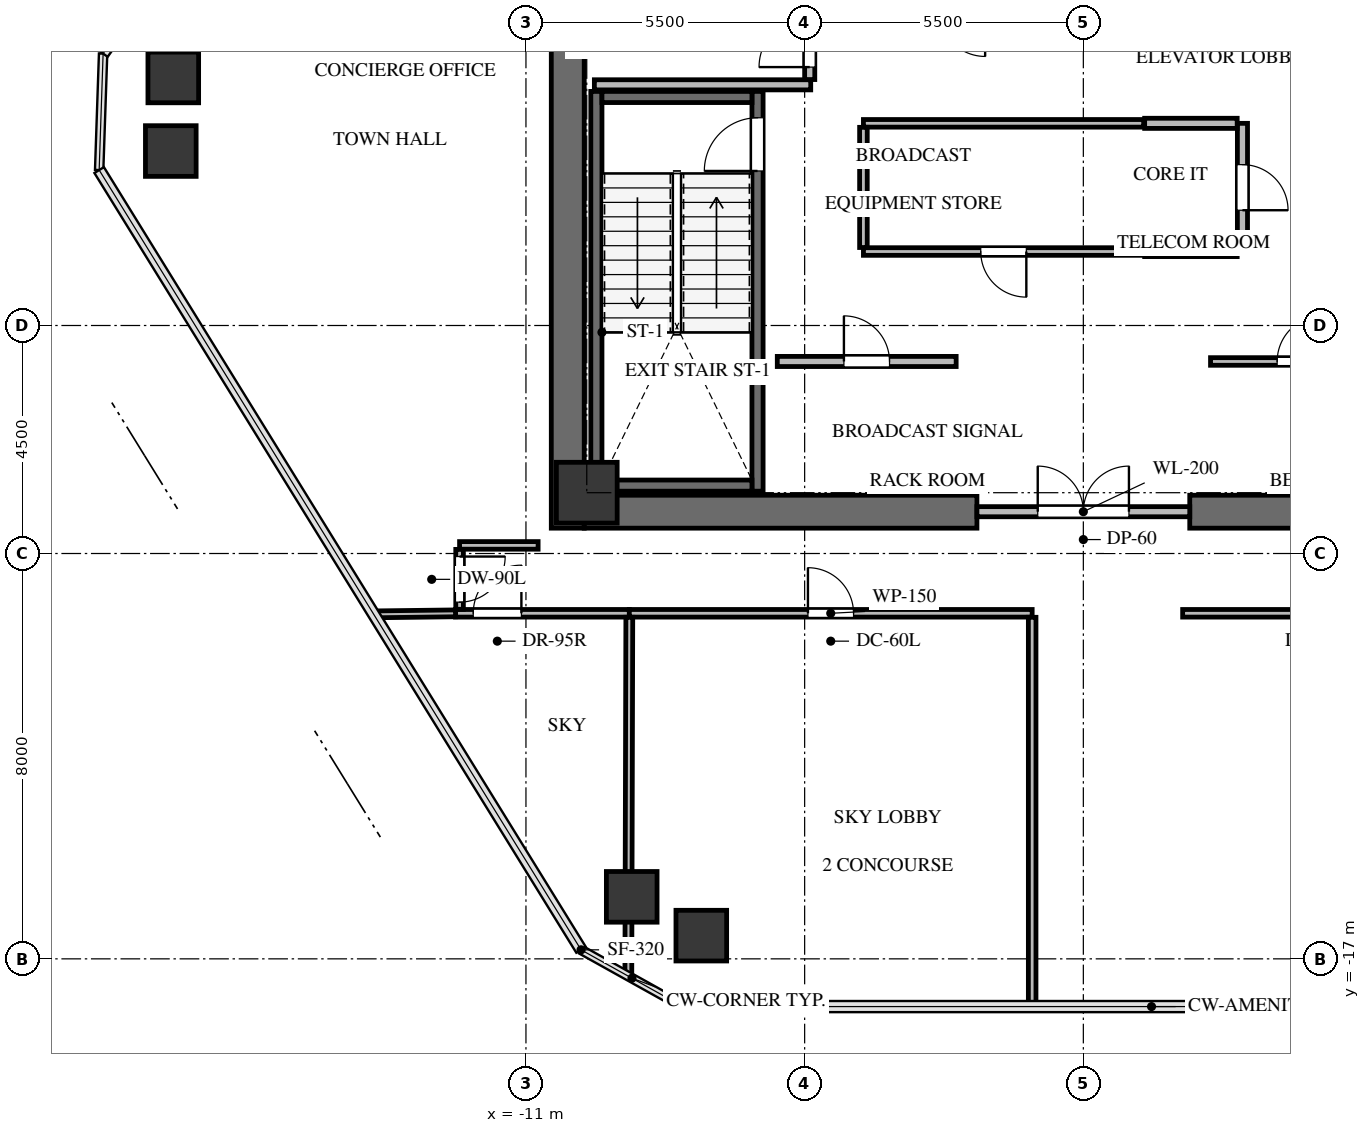
"""IFC4 building model, lengths in metres.
Left out: names, types, materials, properties, quantities, classifications, styles, units other than length and angle.
Written with IfcOpenShell. Run it as: python <this file> out.ifc"""

import sys

from ifc_helpers import new_model, si_unit, direction, frame, frame_2d, origin, origin_2d, place, context, subcontext, project, spatial, rectangle, extrude, source, transform, mapped, element, fill, save


model = new_model("IFC4")
c1 = context("Model", 3, precision=1e-05, world=origin(), true_north=direction((0.0, 1.0)))
c2 = subcontext(c1, "Body", "Model", "MODEL_VIEW")
j1 = project(units=[si_unit("LENGTHUNIT", "METRE"), si_unit("PLANEANGLEUNIT", "RADIAN")], contexts=[c1])
p1 = place(None, origin())
s1 = spatial("IfcSite", under=j1, at=p1, CompositionType="ELEMENT")
p2 = place(p1, origin())
s2 = spatial("IfcBuilding", under=s1, at=p2, CompositionType="ELEMENT")
p3 = place(p2, frame((0.0, 0.0, 155.1)))
s3 = spatial("IfcBuildingStorey", under=s2, at=p3, CompositionType="ELEMENT", Elevation=155.1)
p4 = place(p3, frame((-10.175, -8.5, 0.0), z_axis=(0.0, 0.0, 1.0), x_axis=(0.0, 1.0, 0.0)))
e1 = element("IfcWall", 1, at=p4, inside=s3, PredefinedType="SHEAR", context=c2, shape_type="SweptSolid", body=[
    extrude(rectangle(XDim=17.0, YDim=0.65, at=frame_2d((8.5, 0.0))), origin(), (0.0, 0.0, 1.0), 4.2),
])
for number, where, z_axis, x_axis in (
    (2, (-9.85, -8.175, 0.0), (0.0, 0.0, 1.0), (1.0, 0.0, 0.0)),
    (3, (2.1, -8.175, 0.0), (0.0, 0.0, 1.0), (1.0, 0.0, 0.0)),
):
    element("IfcWall", number, at=place(p3, frame(where, z_axis=z_axis, x_axis=x_axis)), inside=s3, PredefinedType="SHEAR", context=c2, shape_type="SweptSolid", body=[
        extrude(rectangle(XDim=7.75, YDim=0.65, at=frame_2d((3.875, 0.0))), origin(), (0.0, 0.0, 1.0), 4.2),
    ])
p5 = place(p3, frame((-6.43, -7.77, -0.32), z_axis=(0.0, 0.0, 1.0), x_axis=(0.0, 1.0, 0.0)))
e4 = element("IfcWall", 4, at=p5, inside=s3, PredefinedType="SHEAR", context=c2, shape_type="SweptSolid", body=[
    extrude(rectangle(XDim=7.89, YDim=0.22, at=frame_2d((3.945, 0.0))), origin(), (0.0, 0.0, 1.0), 4.28),
])
p6 = place(p5, frame((6.32, 0.0, 0.0)))
e5 = element("IfcOpeningElement", 5, at=p6, cuts=e4, PredefinedType="OPENING", context=c2, shape_type="SweptSolid", body=[
    extrude(rectangle(XDim=1.05, YDim=2.15, at=frame_2d((0.525, 1.075))), frame((0.0, 0.12, 0.0), z_axis=(0.0, -1.0, 0.0), x_axis=(1.0, 0.0, 0.0)), (0.0, 0.0, 1.0), 0.24),
])
p7 = place(p3, frame((-9.61, 0.12, -0.32), z_axis=(0.0, 0.0, 1.0), x_axis=(0.0, -1.0, 0.0)))
e6 = element("IfcWall", 6, at=p7, inside=s3, PredefinedType="SHEAR", context=c2, shape_type="SweptSolid", body=[
    extrude(rectangle(XDim=7.89, YDim=0.22, at=frame_2d((3.945, 0.0))), origin(), (0.0, 0.0, 1.0), 4.28),
])
for number, where, z_axis, x_axis in (
    (7, (-9.5, -7.66, -0.32), (0.0, 0.0, 1.0), (1.0, 0.0, 0.0)),
    (8, (-6.54, 0.01, -0.32), (0.0, 0.0, 1.0), (-1.0, 0.0, 0.0)),
):
    element("IfcWall", number, at=place(p3, frame(where, z_axis=z_axis, x_axis=x_axis)), inside=s3, PredefinedType="SHEAR", context=c2, shape_type="SweptSolid", body=[
        extrude(rectangle(XDim=2.96, YDim=0.22, at=frame_2d((1.48, 0.0))), origin(), (0.0, 0.0, 1.0), 4.28),
    ])
m1 = source(origin(), c2, "Body", "SweptSolid", [
    extrude(rectangle(XDim=1.2, YDim=1.2, at=origin_2d()), origin(), (0.0, 0.0, 1.0), 4.28),
])
p8 = place(p3, frame((-9.8, -7.8, -0.32), z_axis=(0.0, 0.0, 1.0), x_axis=(1.0, 0.0, 0.0)))
e9 = element("IfcColumn", 9, at=p8, inside=s3, PredefinedType="COLUMN", context=c2, shape_type="MappedRepresentation", body=[
    mapped(m1, transform((0.0, 0.0, 0.0), x_axis=(1.0, 0.0, 0.0), y_axis=(0.0, 1.0, 0.0), z_axis=(0.0, 0.0, 1.0), scale=1.0)),
])
m2 = source(origin(), c2, "Body", "SweptSolid", [
    extrude(rectangle(XDim=1.0, YDim=1.0, at=origin_2d()), origin(), (0.0, 0.0, 1.0), 4.28),
])
for number, where, z_axis, x_axis in (
    (10, (-8.913, -15.776, -0.32), (0.0, 0.0, 1.0), (1.0, 0.0, 0.0)),
    (11, (-18.009, -1.057, -0.32), (0.0, 0.0, 1.0), (1.0, 0.0, 0.0)),
    (12, (-17.96, 0.396, -0.32), (0.0, 0.0, 1.0), (1.0, 0.0, 0.0)),
    (13, (-7.54, -16.542, -0.32), (0.0, 0.0, 1.0), (1.0, 0.0, 0.0)),
):
    element("IfcColumn", number, at=place(p3, frame(where, z_axis=z_axis, x_axis=x_axis)), inside=s3, PredefinedType="COLUMN", context=c2, shape_type="MappedRepresentation", body=[
        mapped(m2, transform((0.0, 0.0, 0.0), x_axis=(1.0, 0.0, 0.0), y_axis=(0.0, 1.0, 0.0), z_axis=(0.0, 0.0, 1.0), scale=1.0)),
    ])
p9 = place(p3, frame((-2.1, -8.175, 0.0), z_axis=(0.0, 0.0, 1.0), x_axis=(1.0, 0.0, 0.0)))
e14 = element("IfcWall", 14, at=p9, inside=s3, PredefinedType="SOLIDWALL", context=c2, shape_type="SweptSolid", body=[
    extrude(rectangle(XDim=4.2, YDim=0.2, at=frame_2d((2.1, 0.0))), origin(), (0.0, 0.0, 1.0), 3.945),
])
p10 = place(p9, frame((1.2, 0.0, 0.0)))
e15 = element("IfcOpeningElement", 15, at=p10, cuts=e14, PredefinedType="OPENING", context=c2, shape_type="SweptSolid", body=[
    extrude(rectangle(XDim=1.8, YDim=2.15, at=frame_2d((0.9, 1.075))), frame((0.0, 0.11, 0.0), z_axis=(0.0, -1.0, 0.0), x_axis=(1.0, 0.0, 0.0)), (0.0, 0.0, 1.0), 0.22),
])
p11 = place(p3, frame((-9.65, 0.25, 0.0), z_axis=(0.0, 0.0, 1.0), x_axis=(1.0, 0.0, 0.0)))
e16 = element("IfcWall", 16, at=p11, inside=s3, PredefinedType="SOLIDWALL", context=c2, shape_type="SweptSolid", body=[
    extrude(rectangle(XDim=4.27, YDim=0.2, at=frame_2d((2.135, 0.0))), origin(), (0.0, 0.0, 1.0), 3.945),
])
p12 = place(p3, frame((-5.4, 0.354, 0.0), z_axis=(0.0, 0.0, 1.0), x_axis=(0.0, 1.0, 0.0)))
e17 = element("IfcWall", 17, at=p12, inside=s3, PredefinedType="SOLIDWALL", context=c2, shape_type="SweptSolid", body=[
    extrude(rectangle(XDim=4.026, YDim=0.2, at=frame_2d((2.013, 0.0))), origin(), (0.0, 0.0, 1.0), 3.945),
])
p13 = place(p12, frame((0.246, 0.0, 0.0)))
e18 = element("IfcOpeningElement", 18, at=p13, cuts=e17, PredefinedType="OPENING", context=c2, shape_type="SweptSolid", body=[
    extrude(rectangle(XDim=1.0, YDim=2.15, at=frame_2d((0.5, 1.075))), frame((0.0, 0.11, 0.0), z_axis=(0.0, -1.0, 0.0), x_axis=(1.0, 0.0, 0.0)), (0.0, 0.0, 1.0), 0.22),
])
p14 = place(p3, frame((-6.04, -5.21, 0.0), z_axis=(0.0, 0.0, 1.0), x_axis=(1.0, 0.0, 0.0)))
e19 = element("IfcWall", 19, at=p14, inside=s3, PredefinedType="SOLIDWALL", context=c2, shape_type="SweptSolid", body=[
    extrude(rectangle(XDim=3.53, YDim=0.2, at=frame_2d((1.765, 0.0))), origin(), (0.0, 0.0, 1.0), 3.945),
])
p15 = place(p14, frame((1.315, 0.0, 0.0)))
e20 = element("IfcOpeningElement", 20, at=p15, cuts=e19, PredefinedType="OPENING", context=c2, shape_type="SweptSolid", body=[
    extrude(rectangle(XDim=0.9, YDim=2.05, at=frame_2d((0.45, 1.025))), frame((0.0, 0.11, 0.0), z_axis=(0.0, -1.0, 0.0), x_axis=(1.0, 0.0, 0.0)), (0.0, 0.0, 1.0), 0.22),
])
p16 = place(p3, frame((2.51, -5.21, 0.0), z_axis=(0.0, 0.0, 1.0), x_axis=(1.0, 0.0, 0.0)))
e21 = element("IfcWall", 21, at=p16, inside=s3, PredefinedType="PARTITIONING", context=c2, shape_type="SweptSolid", body=[
    extrude(rectangle(XDim=3.53, YDim=0.15, at=frame_2d((1.765, 0.0))), origin(), (0.0, 0.0, 1.0), 3.945),
])
p17 = place(p16, frame((1.315, 0.0, 0.0)))
e22 = element("IfcOpeningElement", 22, at=p17, cuts=e21, PredefinedType="OPENING", context=c2, shape_type="SweptSolid", body=[
    extrude(rectangle(XDim=0.9, YDim=2.05, at=frame_2d((0.45, 1.025))), frame((0.0, 0.085, 0.0), z_axis=(0.0, -1.0, 0.0), x_axis=(1.0, 0.0, 0.0)), (0.0, 0.0, 1.0), 0.17),
])
p18 = place(p3, frame((1.19, -3.04, 0.0), z_axis=(0.0, 0.0, 1.0), x_axis=(-1.0, 0.0, 0.0)))
e23 = element("IfcWall", 23, at=p18, inside=s3, PredefinedType="PARTITIONING", context=c2, shape_type="SweptSolid", body=[
    extrude(rectangle(XDim=5.53, YDim=0.15, at=frame_2d((2.765, 0.0))), origin(), (0.0, 0.0, 1.0), 3.945),
])
p19 = place(p18, frame((2.315, 0.0, 0.0)))
e24 = element("IfcOpeningElement", 24, at=p19, cuts=e23, PredefinedType="OPENING", context=c2, shape_type="SweptSolid", body=[
    extrude(rectangle(XDim=0.9, YDim=2.05, at=frame_2d((0.45, 1.025))), frame((0.0, 0.085, 0.0), z_axis=(0.0, -1.0, 0.0), x_axis=(1.0, 0.0, 0.0)), (0.0, 0.0, 1.0), 0.17),
])
p20 = place(p3, frame((-4.34, -0.51, 0.0), z_axis=(0.0, 0.0, 1.0), x_axis=(1.0, 0.0, 0.0)))
e25 = element("IfcWall", 25, at=p20, inside=s3, PredefinedType="PARTITIONING", context=c2, shape_type="SweptSolid", body=[
    extrude(rectangle(XDim=5.53, YDim=0.15, at=frame_2d((2.765, 0.0))), origin(), (0.0, 0.0, 1.0), 3.945),
])
p21 = place(p3, frame((-4.34, -2.961, 0.0), z_axis=(0.0, 0.0, 1.0), x_axis=(0.0, 1.0, 0.0)))
e26 = element("IfcWall", 26, at=p21, inside=s3, PredefinedType="PARTITIONING", context=c2, shape_type="SweptSolid", body=[
    extrude(rectangle(XDim=2.372, YDim=0.15, at=frame_2d((1.186, 0.0))), origin(), (0.0, 0.0, 1.0), 3.945),
])
p22 = place(p3, frame((3.14, -0.51, 0.0), z_axis=(0.0, 0.0, 1.0), x_axis=(0.0, -1.0, 0.0)))
e27 = element("IfcWall", 27, at=p22, inside=s3, PredefinedType="SOLIDWALL", context=c2, shape_type="SweptSolid", body=[
    extrude(rectangle(XDim=2.53, YDim=0.2, at=frame_2d((1.265, 0.0))), origin(), (0.0, 0.0, 1.0), 3.945),
])
p23 = place(p22, frame((0.815, 0.0, 0.0)))
e28 = element("IfcOpeningElement", 28, at=p23, cuts=e27, PredefinedType="OPENING", context=c2, shape_type="SweptSolid", body=[
    extrude(rectangle(XDim=0.9, YDim=2.05, at=frame_2d((0.45, 1.025))), frame((0.0, 0.11, 0.0), z_axis=(0.0, -1.0, 0.0), x_axis=(1.0, 0.0, 0.0)), (0.0, 0.0, 1.0), 0.22),
])
for number, where, z_axis, x_axis in (
    (29, (3.036, -3.04, 0.0), (0.0, 0.0, 1.0), (-1.0, 0.0, 0.0)),
    (30, (1.21, -0.51, 0.0), (0.0, 0.0, 1.0), (1.0, 0.0, 0.0)),
):
    element("IfcWall", number, at=place(p3, frame(where, z_axis=z_axis, x_axis=x_axis)), inside=s3, PredefinedType="SOLIDWALL", context=c2, shape_type="SweptSolid", body=[
        extrude(rectangle(XDim=1.826, YDim=0.2, at=frame_2d((0.913, 0.0))), origin(), (0.0, 0.0, 1.0), 3.945),
    ])
p24 = place(p3, frame((-12.39, -10.18, 0.0), z_axis=(0.0, 0.0, 1.0), x_axis=(1.0, 0.0, 0.0)))
e31 = element("IfcWall", 31, at=p24, inside=s3, PredefinedType="PARTITIONING", context=c2, shape_type="SweptSolid", body=[
    extrude(rectangle(XDim=3.43, YDim=0.15, at=frame_2d((1.715, 0.0))), origin(), (0.0, 0.0, 1.0), 3.299),
])
p25 = place(p24, frame((0.35, 0.0, 0.0)))
e32 = element("IfcOpeningElement", 32, at=p25, cuts=e31, PredefinedType="OPENING", context=c2, shape_type="SweptSolid", body=[
    extrude(rectangle(XDim=0.95, YDim=2.1, at=frame_2d((0.475, 1.05))), frame((0.0, 0.085, 0.0), z_axis=(0.0, -1.0, 0.0), x_axis=(1.0, 0.0, 0.0)), (0.0, 0.0, 1.0), 0.17),
])
p26 = place(p3, frame((-8.96, -10.18, 0.0), z_axis=(0.0, 0.0, 1.0), x_axis=(1.0, 0.0, 0.0)))
e33 = element("IfcWall", 33, at=p26, inside=s3, PredefinedType="PARTITIONING", context=c2, shape_type="SweptSolid", body=[
    extrude(rectangle(XDim=7.95, YDim=0.15, at=frame_2d((3.975, 0.0))), origin(), (0.0, 0.0, 1.0), 3.142),
])
p27 = place(p26, frame((3.525, 0.0, 0.0)))
e34 = element("IfcOpeningElement", 34, at=p27, cuts=e33, PredefinedType="OPENING", context=c2, shape_type="SweptSolid", body=[
    extrude(rectangle(XDim=0.9, YDim=2.05, at=frame_2d((0.45, 1.025))), frame((0.0, 0.085, 0.0), z_axis=(0.0, -1.0, 0.0), x_axis=(1.0, 0.0, 0.0)), (0.0, 0.0, 1.0), 0.17),
])
p28 = place(p3, frame((-1.01, -10.259, 0.0), z_axis=(0.0, 0.0, 1.0), x_axis=(0.0, -1.0, 0.0)))
e35 = element("IfcWall", 35, at=p28, inside=s3, PredefinedType="PARTITIONING", context=c2, shape_type="SweptSolid", body=[
    extrude(rectangle(XDim=7.683, YDim=0.15, at=frame_2d((3.841, 0.0))), origin(), (0.0, 0.0, 1.0), 3.299),
])
p29 = place(p3, frame((1.96, -10.18, 0.0), z_axis=(0.0, 0.0, 1.0), x_axis=(1.0, 0.0, 0.0)))
e36 = element("IfcWall", 36, at=p29, inside=s3, PredefinedType="PARTITIONING", context=c2, shape_type="SweptSolid", body=[
    extrude(rectangle(XDim=7.58, YDim=0.15, at=frame_2d((3.79, 0.0))), origin(), (0.0, 0.0, 1.0), 3.142),
])
p30 = place(p29, frame((3.315, 0.0, 0.0)))
e37 = element("IfcOpeningElement", 37, at=p30, cuts=e36, PredefinedType="OPENING", context=c2, shape_type="SweptSolid", body=[
    extrude(rectangle(XDim=0.95, YDim=2.1, at=frame_2d((0.475, 1.05))), frame((0.0, 0.085, 0.0), z_axis=(0.0, -1.0, 0.0), x_axis=(1.0, 0.0, 0.0)), (0.0, 0.0, 1.0), 0.17),
])
p31 = place(p3, frame((-10.76, -8.84, 0.0), z_axis=(0.0, 0.0, 1.0), x_axis=(-1.0, 0.0, 0.0)))
e38 = element("IfcWall", 38, at=p31, inside=s3, PredefinedType="PARTITIONING", context=c2, shape_type="SweptSolid", body=[
    extrude(rectangle(XDim=1.55, YDim=0.15, at=frame_2d((0.775, 0.0))), origin(), (0.0, 0.0, 1.0), 3.945),
])
p32 = place(p3, frame((-12.31, -8.919, 0.0), z_axis=(0.0, 0.0, 1.0), x_axis=(0.0, -1.0, 0.0)))
e39 = element("IfcWall", 39, at=p32, inside=s3, PredefinedType="PARTITIONING", context=c2, shape_type="SweptSolid", body=[
    extrude(rectangle(XDim=1.182, YDim=0.15, at=frame_2d((0.591, 0.0))), origin(), (0.0, 0.0, 1.0), 3.299),
])
p33 = place(p32, frame((0.141, 0.0, 0.0)))
e40 = element("IfcOpeningElement", 40, at=p33, cuts=e39, PredefinedType="OPENING", context=c2, shape_type="SweptSolid", body=[
    extrude(rectangle(XDim=0.9, YDim=2.05, at=frame_2d((0.45, 1.025))), frame((0.0, 0.085, 0.0), z_axis=(0.0, -1.0, 0.0), x_axis=(1.0, 0.0, 0.0)), (0.0, 0.0, 1.0), 0.17),
])
p34 = place(p3, frame((-8.96, -10.259, 0.0), z_axis=(0.0, 0.0, 1.0), x_axis=(-0.002723001073, -0.999996292626, 0.0)))
e41 = element("IfcWall", 41, at=p34, inside=s3, PredefinedType="PARTITIONING", context=c2, shape_type="SweptSolid", body=[
    extrude(rectangle(XDim=7.083, YDim=0.135, at=frame_2d((3.542, 0.0))), origin(), (0.0, 0.0, 1.0), 2.777),
])
p35 = place(p3, frame((-14.004, -10.201, 0.0), z_axis=(0.0, 0.0, 1.0), x_axis=(0.999923084603, 0.012402615782, 0.0)))
e42 = element("IfcWall", 42, at=p35, inside=s3, PredefinedType="PARTITIONING", context=c2, shape_type="SweptSolid", body=[
    extrude(rectangle(XDim=1.614, YDim=0.135, at=frame_2d((0.807, 0.0))), origin(), (0.0, 0.0, 1.0), 3.299),
])
m3 = source(origin(), c2, "Body", "SweptSolid", [
    extrude(rectangle(XDim=1.05, YDim=2.15, at=frame_2d((0.525, 1.075))), frame((0.0, 0.025, 0.0), z_axis=(0.0, -1.0, 0.0), x_axis=(1.0, 0.0, 0.0)), (0.0, 0.0, 1.0), 0.05),
])
p36 = place(p6, origin())
e43 = element("IfcDoor", 43, at=p36, inside=s3, OperationType="SINGLE_SWING_LEFT", PredefinedType="DOOR", context=c2, shape_type="MappedRepresentation", body=[
    mapped(m3, transform((0.0, 0.0, 0.0), x_axis=(1.0, 0.0, 0.0), y_axis=(0.0, 1.0, 0.0), z_axis=(0.0, 0.0, 1.0), scale=1.0)),
])
fill(e5, e43)
m4 = source(origin(), c2, "Body", "SweptSolid", [
    extrude(rectangle(XDim=1.8, YDim=2.15, at=frame_2d((0.9, 1.075))), frame((0.0, 0.025, 0.0), z_axis=(0.0, -1.0, 0.0), x_axis=(1.0, 0.0, 0.0)), (0.0, 0.0, 1.0), 0.05),
])
p37 = place(p10, origin())
e44 = element("IfcDoor", 44, at=p37, inside=s3, OperationType="DOUBLE_DOOR_SINGLE_SWING", PredefinedType="DOOR", context=c2, shape_type="MappedRepresentation", body=[
    mapped(m4, transform((0.0, 0.0, 0.0), x_axis=(1.0, 0.0, 0.0), y_axis=(0.0, 1.0, 0.0), z_axis=(0.0, 0.0, 1.0), scale=1.0)),
])
fill(e15, e44)
m5 = source(origin(), c2, "Body", "SweptSolid", [
    extrude(rectangle(XDim=1.0, YDim=2.15, at=frame_2d((0.5, 1.075))), frame((0.0, 0.025, 0.0), z_axis=(0.0, -1.0, 0.0), x_axis=(1.0, 0.0, 0.0)), (0.0, 0.0, 1.0), 0.05),
])
p38 = place(p13, origin())
e45 = element("IfcDoor", 45, at=p38, inside=s3, OperationType="SINGLE_SWING_LEFT", PredefinedType="DOOR", context=c2, shape_type="MappedRepresentation", body=[
    mapped(m5, transform((0.0, 0.0, 0.0), x_axis=(1.0, 0.0, 0.0), y_axis=(0.0, 1.0, 0.0), z_axis=(0.0, 0.0, 1.0), scale=1.0)),
])
fill(e18, e45)
m6 = source(origin(), c2, "Body", "SweptSolid", [
    extrude(rectangle(XDim=0.9, YDim=2.05, at=frame_2d((0.45, 1.025))), frame((0.0, 0.025, 0.0), z_axis=(0.0, -1.0, 0.0), x_axis=(1.0, 0.0, 0.0)), (0.0, 0.0, 1.0), 0.05),
])
p39 = place(p15, origin())
e46 = element("IfcDoor", 46, at=p39, inside=s3, OperationType="SINGLE_SWING_LEFT", PredefinedType="DOOR", context=c2, shape_type="MappedRepresentation", body=[
    mapped(m6, transform((0.0, 0.0, 0.0), x_axis=(1.0, 0.0, 0.0), y_axis=(0.0, 1.0, 0.0), z_axis=(0.0, 0.0, 1.0), scale=1.0)),
])
fill(e20, e46)
m7 = source(origin(), c2, "Body", "SweptSolid", [
    extrude(rectangle(XDim=0.9, YDim=2.05, at=frame_2d((0.45, 1.025))), frame((0.0, 0.025, 0.0), z_axis=(0.0, -1.0, 0.0), x_axis=(1.0, 0.0, 0.0)), (0.0, 0.0, 1.0), 0.05),
])
p40 = place(p17, origin())
e47 = element("IfcDoor", 47, at=p40, inside=s3, OperationType="SINGLE_SWING_RIGHT", PredefinedType="DOOR", context=c2, shape_type="MappedRepresentation", body=[
    mapped(m7, transform((0.0, 0.0, 0.0), x_axis=(1.0, 0.0, 0.0), y_axis=(0.0, 1.0, 0.0), z_axis=(0.0, 0.0, 1.0), scale=1.0)),
])
fill(e22, e47)
p41 = place(p19, origin())
e48 = element("IfcDoor", 48, at=p41, inside=s3, OperationType="SINGLE_SWING_LEFT", PredefinedType="DOOR", context=c2, shape_type="MappedRepresentation", body=[
    mapped(m6, transform((0.0, 0.0, 0.0), x_axis=(1.0, 0.0, 0.0), y_axis=(0.0, 1.0, 0.0), z_axis=(0.0, 0.0, 1.0), scale=1.0)),
])
fill(e24, e48)
p42 = place(p23, origin())
e49 = element("IfcDoor", 49, at=p42, inside=s3, OperationType="SINGLE_SWING_RIGHT", PredefinedType="DOOR", context=c2, shape_type="MappedRepresentation", body=[
    mapped(m7, transform((0.0, 0.0, 0.0), x_axis=(1.0, 0.0, 0.0), y_axis=(0.0, 1.0, 0.0), z_axis=(0.0, 0.0, 1.0), scale=1.0)),
])
fill(e28, e49)
m8 = source(origin(), c2, "Body", "SweptSolid", [
    extrude(rectangle(XDim=0.95, YDim=2.1, at=frame_2d((0.475, 1.05))), frame((0.0, 0.025, 0.0), z_axis=(0.0, -1.0, 0.0), x_axis=(1.0, 0.0, 0.0)), (0.0, 0.0, 1.0), 0.05),
])
p43 = place(p25, origin())
e50 = element("IfcDoor", 50, at=p43, inside=s3, OperationType="SINGLE_SWING_RIGHT", PredefinedType="DOOR", context=c2, shape_type="MappedRepresentation", body=[
    mapped(m8, transform((0.0, 0.0, 0.0), x_axis=(1.0, 0.0, 0.0), y_axis=(0.0, 1.0, 0.0), z_axis=(0.0, 0.0, 1.0), scale=1.0)),
])
fill(e32, e50)
p44 = place(p27, origin())
e51 = element("IfcDoor", 51, at=p44, inside=s3, OperationType="SINGLE_SWING_LEFT", PredefinedType="DOOR", context=c2, shape_type="MappedRepresentation", body=[
    mapped(m6, transform((0.0, 0.0, 0.0), x_axis=(1.0, 0.0, 0.0), y_axis=(0.0, 1.0, 0.0), z_axis=(0.0, 0.0, 1.0), scale=1.0)),
])
fill(e34, e51)
m9 = source(origin(), c2, "Body", "SweptSolid", [
    extrude(rectangle(XDim=0.9, YDim=2.05, at=frame_2d((0.45, 1.025))), frame((0.0, 0.025, 0.0), z_axis=(0.0, -1.0, 0.0), x_axis=(1.0, 0.0, 0.0)), (0.0, 0.0, 1.0), 0.05),
])
p45 = place(p33, origin())
e52 = element("IfcDoor", 52, at=p45, inside=s3, OperationType="SINGLE_SWING_LEFT", PredefinedType="DOOR", context=c2, shape_type="MappedRepresentation", body=[
    mapped(m9, transform((0.0, 0.0, 0.0), x_axis=(1.0, 0.0, 0.0), y_axis=(0.0, 1.0, 0.0), z_axis=(0.0, 0.0, 1.0), scale=1.0)),
])
fill(e40, e52)
save(model, sys.argv[1])
